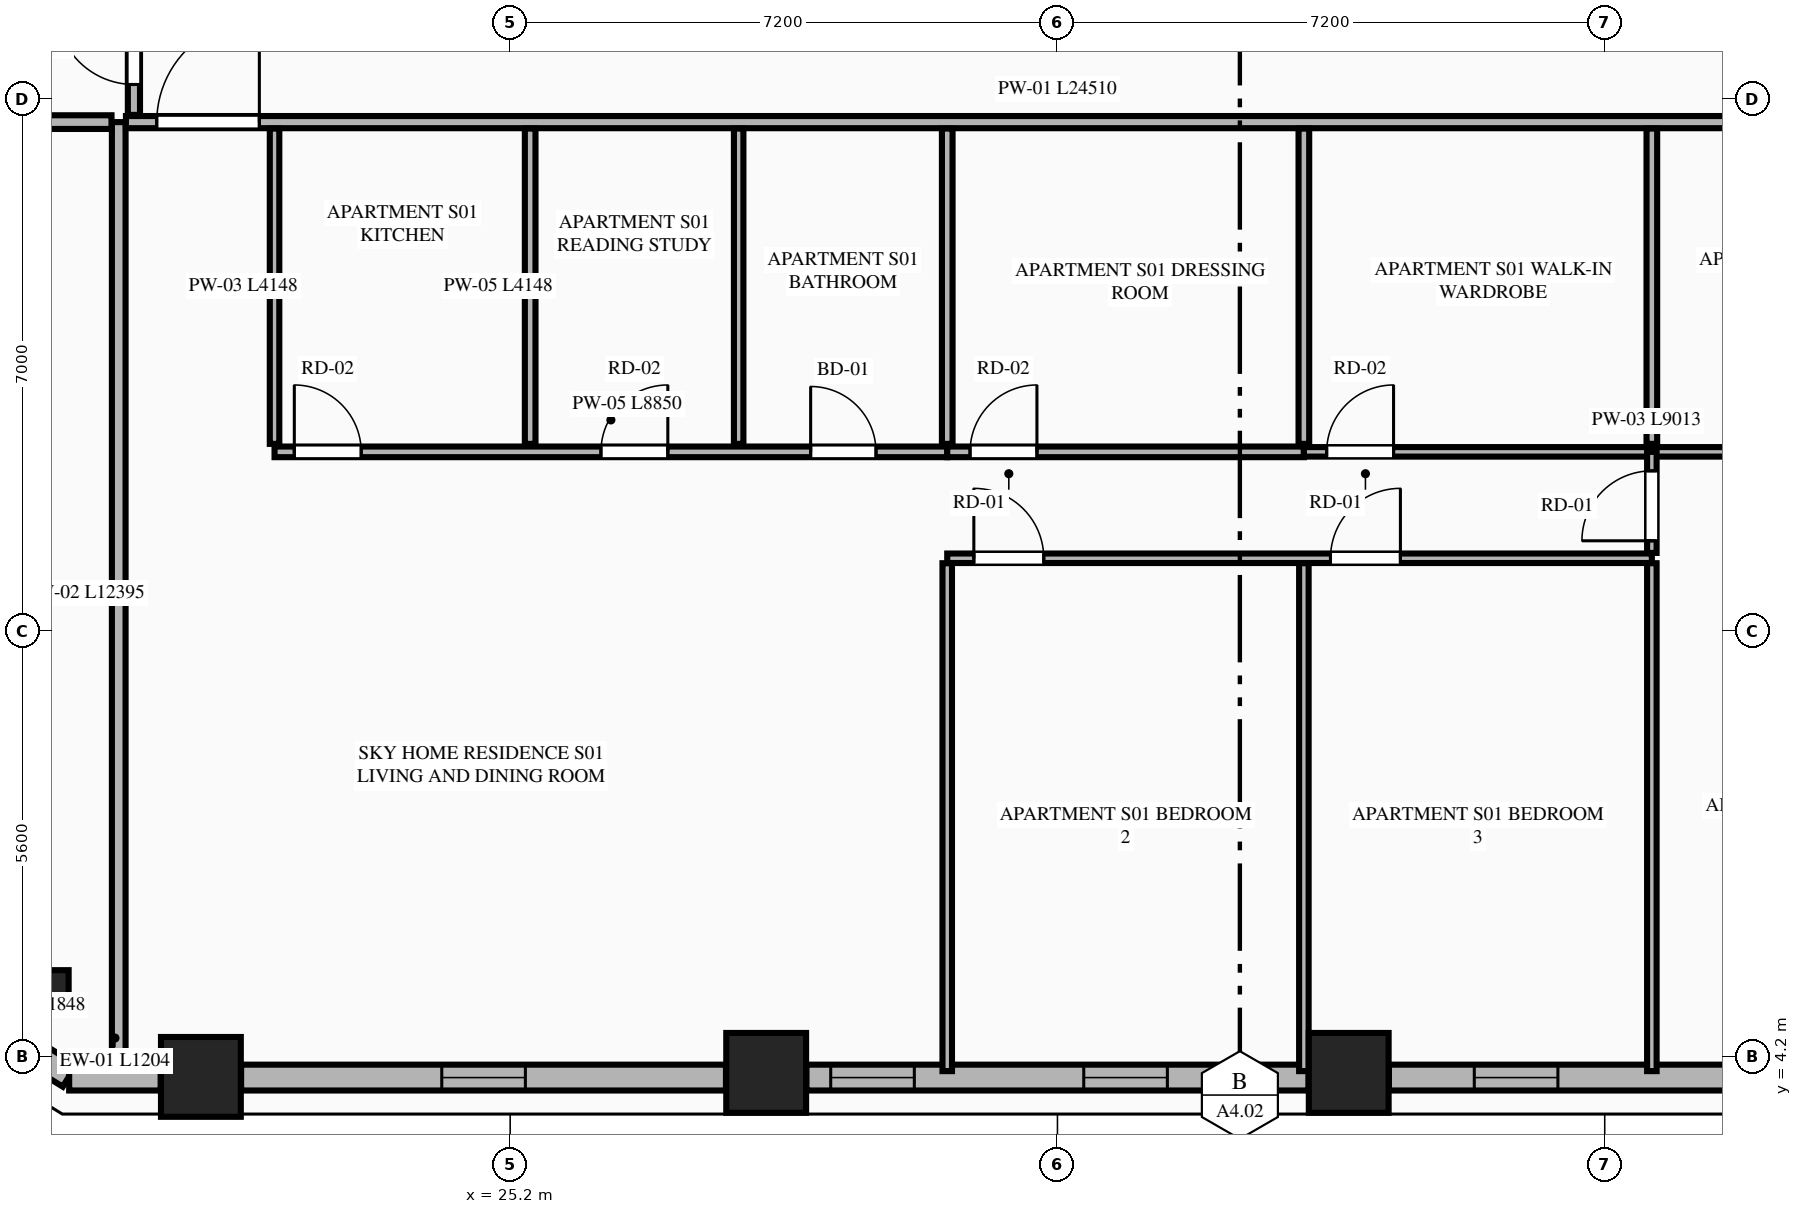
"""IFC4 building model, lengths in metres.
Left out: names, types, materials, properties, quantities, classifications, styles, units other than length and angle.
Written with IfcOpenShell. Run it as: python <this file> out.ifc"""

import sys

from ifc_helpers import new_model, si_unit, direction, frame, frame_2d, origin, origin_2d, place, context, subcontext, project, spatial, rectangle, extrude, element, fill, save


model = new_model("IFC4")
c1 = context("Model", 3, precision=1e-05, world=origin(), true_north=direction((0.0, 1.0)))
c2 = subcontext(c1, "Body", "Model", "MODEL_VIEW")
j1 = project(units=[si_unit("LENGTHUNIT", "METRE"), si_unit("PLANEANGLEUNIT", "RADIAN")], contexts=[c1])
p1 = place(None, origin())
s1 = spatial("IfcSite", under=j1, at=p1, CompositionType="ELEMENT")
p2 = place(p1, origin())
s2 = spatial("IfcBuilding", under=s1, at=p2, CompositionType="ELEMENT")
p3 = place(p2, frame((0.0, 0.0, 144.55)))
s3 = spatial("IfcBuildingStorey", under=s2, at=p3, CompositionType="ELEMENT", Elevation=144.55)
for number, where, z_axis, x_axis in (
    (1, (21.131, 3.939, 0.0), (0.0, 0.0, 1.0), (1.0, 0.0, 0.0)),
    (2, (28.568, 3.992, 0.0), (0.0, 0.0, 1.0), (1.0, 0.0, 0.0)),
    (3, (36.232, 3.992, 0.0), (0.0, 0.0, 1.0), (1.0, 0.0, 0.0)),
):
    element("IfcColumn", number, at=place(p3, frame(where, z_axis=z_axis, x_axis=x_axis)), inside=s3, PredefinedType="COLUMN", context=c2, shape_type="SweptSolid", body=[
        extrude(rectangle(XDim=1.05, YDim=1.05, at=origin_2d()), origin(), (0.0, 0.0, 1.0), 3.55),
    ])
p4 = place(p3, frame((19.141, 5.093, 0.0), z_axis=(0.0, 0.0, 1.0), x_axis=(0.865160173452, -0.501495637342, 0.0)))
e4 = element("IfcColumn", 4, at=p4, inside=s3, PredefinedType="PILASTER", context=c2, shape_type="SweptSolid", body=[
    extrude(rectangle(XDim=0.5, YDim=0.35, at=origin_2d()), origin(), (0.0, 0.0, 1.0), 3.55),
])
p5 = place(p3, frame((17.829, 4.923, 0.0), z_axis=(0.0, 0.0, 1.0), x_axis=(0.851798915137, -0.523868884523, 0.0)))
e5 = element("IfcWall", 5, at=p5, inside=s3, PredefinedType="STANDARD", context=c2, shape_type="SweptSolid", body=[
    extrude(rectangle(XDim=1.848, YDim=0.34, at=frame_2d((0.924, 0.0))), origin(), (0.0, 0.0, 1.0), 3.27),
])
p6 = place(p3, frame((19.398, 3.93, 0.0), z_axis=(0.0, 0.0, 1.0), x_axis=(1.0, 0.0, 0.0)))
e6 = element("IfcWall", 6, at=p6, inside=s3, PredefinedType="STANDARD", context=c2, shape_type="SweptSolid", body=[
    extrude(rectangle(XDim=1.204, YDim=0.34, at=frame_2d((0.602, 0.0))), origin(), (0.0, 0.0, 1.0), 3.27),
])
p7 = place(p3, frame((21.66, 3.93, 0.0), z_axis=(0.0, 0.0, 1.0), x_axis=(1.0, 0.0, 0.0)))
e7 = element("IfcWall", 7, at=p7, inside=s3, PredefinedType="STANDARD", context=c2, shape_type="SweptSolid", body=[
    extrude(rectangle(XDim=6.379, YDim=0.34, at=frame_2d((3.189, 0.0))), origin(), (0.0, 0.0, 1.0), 2.727),
])
p8 = place(p7, frame((2.64, 0.0, 0.75)))
e8 = element("IfcOpeningElement", 8, at=p8, cuts=e7, PredefinedType="OPENING", context=c2, shape_type="SweptSolid", body=[
    extrude(rectangle(XDim=1.1, YDim=1.827, at=frame_2d((0.55, 0.914))), frame((0.0, 0.18, 0.0), z_axis=(0.0, -1.0, 0.0), x_axis=(1.0, 0.0, 0.0)), (0.0, 0.0, 1.0), 0.36),
])
p9 = place(p3, frame((29.097, 3.93, 0.0), z_axis=(0.0, 0.0, 1.0), x_axis=(1.0, 0.0, 0.0)))
e9 = element("IfcWall", 9, at=p9, inside=s3, PredefinedType="STANDARD", context=c2, shape_type="SweptSolid", body=[
    extrude(rectangle(XDim=6.606, YDim=0.34, at=frame_2d((3.303, 0.0))), origin(), (0.0, 0.0, 1.0), 2.727),
])
p10 = place(p9, frame((0.32, 0.0, 0.75)))
e10 = element("IfcOpeningElement", 10, at=p10, cuts=e9, PredefinedType="OPENING", context=c2, shape_type="SweptSolid", body=[
    extrude(rectangle(XDim=1.1, YDim=1.827, at=frame_2d((0.55, 0.914))), frame((0.0, 0.18, 0.0), z_axis=(0.0, -1.0, 0.0), x_axis=(1.0, 0.0, 0.0)), (0.0, 0.0, 1.0), 0.36),
])
p11 = place(p9, frame((3.649, 0.0, 0.75)))
e11 = element("IfcOpeningElement", 11, at=p11, cuts=e9, PredefinedType="OPENING", context=c2, shape_type="SweptSolid", body=[
    extrude(rectangle(XDim=1.1, YDim=1.827, at=frame_2d((0.55, 0.914))), frame((0.0, 0.18, 0.0), z_axis=(0.0, -1.0, 0.0), x_axis=(1.0, 0.0, 0.0)), (0.0, 0.0, 1.0), 0.36),
])
p12 = place(p3, frame((36.761, 3.93, 0.0), z_axis=(0.0, 0.0, 1.0), x_axis=(1.0, 0.0, 0.0)))
e12 = element("IfcWall", 12, at=p12, inside=s3, PredefinedType="STANDARD", context=c2, shape_type="SweptSolid", body=[
    extrude(rectangle(XDim=6.379, YDim=0.34, at=frame_2d((3.189, 0.0))), origin(), (0.0, 0.0, 1.0), 2.727),
])
p13 = place(p12, frame((1.123, 0.0, 0.75)))
e13 = element("IfcOpeningElement", 13, at=p13, cuts=e12, PredefinedType="OPENING", context=c2, shape_type="SweptSolid", body=[
    extrude(rectangle(XDim=1.1, YDim=1.827, at=frame_2d((0.55, 0.914))), frame((0.0, 0.18, 0.0), z_axis=(0.0, -1.0, 0.0), x_axis=(1.0, 0.0, 0.0)), (0.0, 0.0, 1.0), 0.36),
])
p14 = place(p12, frame((4.425, 0.0, 0.75)))
e14 = element("IfcOpeningElement", 14, at=p14, cuts=e12, PredefinedType="OPENING", context=c2, shape_type="SweptSolid", body=[
    extrude(rectangle(XDim=1.1, YDim=1.827, at=frame_2d((0.55, 0.914))), frame((0.0, 0.18, 0.0), z_axis=(0.0, -1.0, 0.0), x_axis=(1.0, 0.0, 0.0)), (0.0, 0.0, 1.0), 0.36),
])
p15 = place(p3, frame((20.05, 4.105, 0.0), z_axis=(0.0, 0.0, 1.0), x_axis=(0.0, 1.0, 0.0)))
e15 = element("IfcWall", 15, at=p15, inside=s3, PredefinedType="PARTITIONING", context=c2, shape_type="SweptSolid", body=[
    extrude(rectangle(XDim=12.395, YDim=0.18, at=frame_2d((6.198, 0.0))), origin(), (0.0, 0.0, 1.0), 3.27),
])
p16 = place(p3, frame((20.145, 16.5, 0.0), z_axis=(0.0, 0.0, 1.0), x_axis=(1.0, 0.0, 0.0)))
e16 = element("IfcWall", 16, at=p16, inside=s3, PredefinedType="PARTITIONING", context=c2, shape_type="SweptSolid", body=[
    extrude(rectangle(XDim=24.51, YDim=0.16, at=frame_2d((12.255, 0.0))), origin(), (0.0, 0.0, 1.0), 3.27),
])
p17 = place(p16, frame((0.405, 0.0, 0.0)))
e17 = element("IfcOpeningElement", 17, at=p17, cuts=e16, PredefinedType="OPENING", context=c2, shape_type="SweptSolid", body=[
    extrude(rectangle(XDim=1.35, YDim=2.35, at=frame_2d((0.675, 1.175))), frame((0.0, 0.09, 0.0), z_axis=(0.0, -1.0, 0.0), x_axis=(1.0, 0.0, 0.0)), (0.0, 0.0, 1.0), 0.18),
])
p18 = place(p3, frame((22.1, 12.267, 0.0), z_axis=(0.0, 0.0, 1.0), x_axis=(0.0, 1.0, 0.0)))
e18 = element("IfcWall", 18, at=p18, inside=s3, PredefinedType="PARTITIONING", context=c2, shape_type="SweptSolid", body=[
    extrude(rectangle(XDim=4.148, YDim=0.125, at=frame_2d((2.074, 0.0))), origin(), (0.0, 0.0, 1.0), 2.652),
])
p19 = place(p3, frame((22.1, 12.162, 0.0), z_axis=(0.0, 0.0, 1.0), x_axis=(1.0, 0.0, 0.0)))
e19 = element("IfcWall", 19, at=p19, inside=s3, PredefinedType="PLUMBINGWALL", context=c2, shape_type="SweptSolid", body=[
    extrude(rectangle(XDim=8.85, YDim=0.14, at=frame_2d((4.425, 0.0))), origin(), (0.0, 0.0, 1.0), 3.27),
])
p20 = place(p19, frame((7.053, 0.0, 0.0)))
e20 = element("IfcOpeningElement", 20, at=p20, cuts=e19, PredefinedType="OPENING", context=c2, shape_type="SweptSolid", body=[
    extrude(rectangle(XDim=0.86, YDim=2.1, at=frame_2d((0.43, 1.05))), frame((0.0, 0.08, 0.0), z_axis=(0.0, -1.0, 0.0), x_axis=(1.0, 0.0, 0.0)), (0.0, 0.0, 1.0), 0.16),
])
p21 = place(p19, frame((0.26, 0.0, 0.0)))
e21 = element("IfcOpeningElement", 21, at=p21, cuts=e19, PredefinedType="OPENING", context=c2, shape_type="SweptSolid", body=[
    extrude(rectangle(XDim=0.88, YDim=2.15, at=frame_2d((0.44, 1.075))), frame((0.0, 0.08, 0.0), z_axis=(0.0, -1.0, 0.0), x_axis=(1.0, 0.0, 0.0)), (0.0, 0.0, 1.0), 0.16),
])
p22 = place(p19, frame((4.294, 0.0, 0.0)))
e22 = element("IfcOpeningElement", 22, at=p22, cuts=e19, PredefinedType="OPENING", context=c2, shape_type="SweptSolid", body=[
    extrude(rectangle(XDim=0.88, YDim=2.15, at=frame_2d((0.44, 1.075))), frame((0.0, 0.08, 0.0), z_axis=(0.0, -1.0, 0.0), x_axis=(1.0, 0.0, 0.0)), (0.0, 0.0, 1.0), 0.16),
])
p23 = place(p3, frame((30.95, 12.162, 0.0), z_axis=(0.0, 0.0, 1.0), x_axis=(1.0, 0.0, 0.0)))
e23 = element("IfcWall", 23, at=p23, inside=s3, PredefinedType="PLUMBINGWALL", context=c2, shape_type="SweptSolid", body=[
    extrude(rectangle(XDim=4.692, YDim=0.14, at=frame_2d((2.346, 0.0))), origin(), (0.0, 0.0, 1.0), 3.27),
])
p24 = place(p23, frame((0.3, 0.0, 0.0)))
e24 = element("IfcOpeningElement", 24, at=p24, cuts=e23, PredefinedType="OPENING", context=c2, shape_type="SweptSolid", body=[
    extrude(rectangle(XDim=0.88, YDim=2.15, at=frame_2d((0.44, 1.075))), frame((0.0, 0.08, 0.0), z_axis=(0.0, -1.0, 0.0), x_axis=(1.0, 0.0, 0.0)), (0.0, 0.0, 1.0), 0.16),
])
p25 = place(p3, frame((35.642, 12.162, 0.0), z_axis=(0.0, 0.0, 1.0), x_axis=(1.0, 0.0, 0.0)))
e25 = element("IfcWall", 25, at=p25, inside=s3, PredefinedType="PARTITIONING", context=c2, shape_type="SweptSolid", body=[
    extrude(rectangle(XDim=9.013, YDim=0.125, at=frame_2d((4.506, 0.0))), origin(), (0.0, 0.0, 1.0), 3.27),
])
p26 = place(p25, frame((6.37, 0.0, 0.0)))
e26 = element("IfcOpeningElement", 26, at=p26, cuts=e25, PredefinedType="OPENING", context=c2, shape_type="SweptSolid", body=[
    extrude(rectangle(XDim=0.86, YDim=2.1, at=frame_2d((0.43, 1.05))), frame((0.0, 0.073, 0.0), z_axis=(0.0, -1.0, 0.0), x_axis=(1.0, 0.0, 0.0)), (0.0, 0.0, 1.0), 0.145),
])
p27 = place(p25, frame((0.3, 0.0, 0.0)))
e27 = element("IfcOpeningElement", 27, at=p27, cuts=e25, PredefinedType="OPENING", context=c2, shape_type="SweptSolid", body=[
    extrude(rectangle(XDim=0.88, YDim=2.15, at=frame_2d((0.44, 1.075))), frame((0.0, 0.073, 0.0), z_axis=(0.0, -1.0, 0.0), x_axis=(1.0, 0.0, 0.0)), (0.0, 0.0, 1.0), 0.145),
])
p28 = place(p3, frame((25.463, 12.267, 0.0), z_axis=(0.0, 0.0, 1.0), x_axis=(0.0, 1.0, 0.0)))
e28 = element("IfcWall", 28, at=p28, inside=s3, PredefinedType="PLUMBINGWALL", context=c2, shape_type="SweptSolid", body=[
    extrude(rectangle(XDim=4.148, YDim=0.14, at=frame_2d((2.074, 0.0))), origin(), (0.0, 0.0, 1.0), 3.27),
])
p29 = place(p3, frame((28.206, 12.267, 0.0), z_axis=(0.0, 0.0, 1.0), x_axis=(0.0, 1.0, 0.0)))
e29 = element("IfcWall", 29, at=p29, inside=s3, PredefinedType="PARTITIONING", context=c2, shape_type="SweptSolid", body=[
    extrude(rectangle(XDim=4.148, YDim=0.125, at=frame_2d((2.074, 0.0))), origin(), (0.0, 0.0, 1.0), 3.27),
])
p30 = place(p3, frame((30.95, 4.015, 0.0), z_axis=(0.0, 0.0, 1.0), x_axis=(0.0, 1.0, 0.0)))
e30 = element("IfcWall", 30, at=p30, inside=s3, PredefinedType="PARTITIONING", context=c2, shape_type="SweptSolid", body=[
    extrude(rectangle(XDim=6.682, YDim=0.125, at=frame_2d((3.341, 0.0))), origin(), (0.0, 0.0, 1.0), 3.27),
])
p31 = place(p3, frame((30.95, 10.762, 0.0), z_axis=(0.0, 0.0, 1.0), x_axis=(1.0, 0.0, 0.0)))
e31 = element("IfcWall", 31, at=p31, inside=s3, PredefinedType="PARTITIONING", context=c2, shape_type="SweptSolid", body=[
    extrude(rectangle(XDim=9.27, YDim=0.125, at=frame_2d((4.635, 0.0))), origin(), (0.0, 0.0, 1.0), 3.27),
])
p32 = place(p31, frame((0.35, 0.0, 0.0)))
e32 = element("IfcOpeningElement", 32, at=p32, cuts=e31, PredefinedType="OPENING", context=c2, shape_type="SweptSolid", body=[
    extrude(rectangle(XDim=0.92, YDim=2.15, at=frame_2d((0.46, 1.075))), frame((0.0, 0.073, 0.0), z_axis=(0.0, -1.0, 0.0), x_axis=(1.0, 0.0, 0.0)), (0.0, 0.0, 1.0), 0.145),
])
p33 = place(p31, frame((5.042, 0.0, 0.0)))
e33 = element("IfcOpeningElement", 33, at=p33, cuts=e31, PredefinedType="OPENING", context=c2, shape_type="SweptSolid", body=[
    extrude(rectangle(XDim=0.92, YDim=2.15, at=frame_2d((0.46, 1.075))), frame((0.0, 0.073, 0.0), z_axis=(0.0, -1.0, 0.0), x_axis=(1.0, 0.0, 0.0)), (0.0, 0.0, 1.0), 0.145),
])
p34 = place(p3, frame((40.22, 10.832, 0.0), z_axis=(0.0, 0.0, 1.0), x_axis=(0.0, 1.0, 0.0)))
e34 = element("IfcWall", 34, at=p34, inside=s3, PredefinedType="PARTITIONING", context=c2, shape_type="SweptSolid", body=[
    extrude(rectangle(XDim=1.33, YDim=0.125, at=frame_2d((0.665, 0.0))), origin(), (0.0, 0.0, 1.0), 3.27),
])
p35 = place(p34, frame((0.16, 0.0, 0.0)))
e35 = element("IfcOpeningElement", 35, at=p35, cuts=e34, PredefinedType="OPENING", context=c2, shape_type="SweptSolid", body=[
    extrude(rectangle(XDim=0.92, YDim=2.15, at=frame_2d((0.46, 1.075))), frame((0.0, 0.073, 0.0), z_axis=(0.0, -1.0, 0.0), x_axis=(1.0, 0.0, 0.0)), (0.0, 0.0, 1.0), 0.145),
])
for number, where, z_axis, x_axis in (
    (36, (30.95, 12.267, 0.0), (0.0, 0.0, 1.0), (0.0, 1.0, 0.0)),
    (37, (35.642, 12.267, 0.0), (0.0, 0.0, 1.0), (0.0, 1.0, 0.0)),
):
    element("IfcWall", number, at=place(p3, frame(where, z_axis=z_axis, x_axis=x_axis)), inside=s3, PredefinedType="PLUMBINGWALL", context=c2, shape_type="SweptSolid", body=[
        extrude(rectangle(XDim=4.148, YDim=0.14, at=frame_2d((2.074, 0.0))), origin(), (0.0, 0.0, 1.0), 3.27),
    ])
for number, where, z_axis, x_axis in (
    (38, (35.642, 4.015, 0.0), (0.0, 0.0, 1.0), (0.0, 1.0, 0.0)),
    (39, (40.22, 4.015, 0.0), (0.0, 0.0, 1.0), (0.0, 1.0, 0.0)),
):
    element("IfcWall", number, at=place(p3, frame(where, z_axis=z_axis, x_axis=x_axis)), inside=s3, PredefinedType="PARTITIONING", context=c2, shape_type="SweptSolid", body=[
        extrude(rectangle(XDim=6.682, YDim=0.125, at=frame_2d((3.341, 0.0))), origin(), (0.0, 0.0, 1.0), 3.27),
    ])
p36 = place(p3, frame((40.22, 12.267, 0.0), z_axis=(0.0, 0.0, 1.0), x_axis=(0.0, 1.0, 0.0)))
e40 = element("IfcWall", 40, at=p36, inside=s3, PredefinedType="PLUMBINGWALL", context=c2, shape_type="SweptSolid", body=[
    extrude(rectangle(XDim=4.148, YDim=0.14, at=frame_2d((2.074, 0.0))), origin(), (0.0, 0.0, 1.0), 3.27),
])
p37 = place(p3, frame((12.185, 16.5, 0.0), z_axis=(0.0, 0.0, 1.0), x_axis=(1.0, 0.0, 0.0)))
e41 = element("IfcWall", 41, at=p37, inside=s3, PredefinedType="PARTITIONING", context=c2, shape_type="SweptSolid", body=[
    extrude(rectangle(XDim=7.77, YDim=0.18, at=frame_2d((3.885, 0.0))), origin(), (0.0, 0.0, 1.0), 3.27),
])
p38 = place(p3, frame((20.25, 16.595, 0.0), z_axis=(0.0, 0.0, 1.0), x_axis=(0.0, 1.0, 0.0)))
e42 = element("IfcWall", 42, at=p38, inside=s3, PredefinedType="PARTITIONING", context=c2, shape_type="SweptSolid", body=[
    extrude(rectangle(XDim=7.706, YDim=0.16, at=frame_2d((3.853, 0.0))), origin(), (0.0, 0.0, 1.0), 3.27),
])
p39 = place(p38, frame((0.4, 0.0, 0.0)))
e43 = element("IfcOpeningElement", 43, at=p39, cuts=e42, PredefinedType="OPENING", context=c2, shape_type="SweptSolid", body=[
    extrude(rectangle(XDim=1.02, YDim=2.25, at=frame_2d((0.51, 1.125))), frame((0.0, 0.09, 0.0), z_axis=(0.0, -1.0, 0.0), x_axis=(1.0, 0.0, 0.0)), (0.0, 0.0, 1.0), 0.18),
])
p40 = place(p8, origin())
e44 = element("IfcWindow", 44, at=p40, inside=s3, PartitioningType="SINGLE_PANEL", PredefinedType="WINDOW", context=c2, shape_type="SweptSolid", body=[
    extrude(rectangle(XDim=1.1, YDim=1.827, at=frame_2d((0.55, 0.914))), frame((0.0, 0.03, 0.0), z_axis=(0.0, -1.0, 0.0), x_axis=(1.0, 0.0, 0.0)), (0.0, 0.0, 1.0), 0.06),
])
fill(e8, e44)
p41 = place(p10, origin())
e45 = element("IfcWindow", 45, at=p41, inside=s3, PartitioningType="SINGLE_PANEL", PredefinedType="WINDOW", context=c2, shape_type="SweptSolid", body=[
    extrude(rectangle(XDim=1.1, YDim=1.827, at=frame_2d((0.55, 0.914))), frame((0.0, 0.03, 0.0), z_axis=(0.0, -1.0, 0.0), x_axis=(1.0, 0.0, 0.0)), (0.0, 0.0, 1.0), 0.06),
])
fill(e10, e45)
p42 = place(p13, origin())
e46 = element("IfcWindow", 46, at=p42, inside=s3, PartitioningType="SINGLE_PANEL", PredefinedType="WINDOW", context=c2, shape_type="SweptSolid", body=[
    extrude(rectangle(XDim=1.1, YDim=1.827, at=frame_2d((0.55, 0.914))), frame((0.0, 0.03, 0.0), z_axis=(0.0, -1.0, 0.0), x_axis=(1.0, 0.0, 0.0)), (0.0, 0.0, 1.0), 0.06),
])
fill(e13, e46)
p43 = place(p20, origin())
e47 = element("IfcDoor", 47, at=p43, inside=s3, OperationType="SINGLE_SWING_LEFT", PredefinedType="DOOR", context=c2, shape_type="SweptSolid", body=[
    extrude(rectangle(XDim=0.86, YDim=2.1, at=frame_2d((0.43, 1.05))), frame((0.0, 0.025, 0.0), z_axis=(0.0, -1.0, 0.0), x_axis=(1.0, 0.0, 0.0)), (0.0, 0.0, 1.0), 0.05),
])
fill(e20, e47)
p44 = place(p17, origin())
e48 = element("IfcDoor", 48, at=p44, inside=s3, OperationType="SINGLE_SWING_RIGHT", PredefinedType="DOOR", context=c2, shape_type="SweptSolid", body=[
    extrude(rectangle(XDim=1.35, YDim=2.35, at=frame_2d((0.675, 1.175))), frame((0.0, 0.025, 0.0), z_axis=(0.0, -1.0, 0.0), x_axis=(1.0, 0.0, 0.0)), (0.0, 0.0, 1.0), 0.05),
])
fill(e17, e48)
p45 = place(p21, origin())
e49 = element("IfcDoor", 49, at=p45, inside=s3, OperationType="SINGLE_SWING_LEFT", PredefinedType="DOOR", context=c2, shape_type="SweptSolid", body=[
    extrude(rectangle(XDim=0.88, YDim=2.15, at=frame_2d((0.44, 1.075))), frame((0.0, 0.025, 0.0), z_axis=(0.0, -1.0, 0.0), x_axis=(1.0, 0.0, 0.0)), (0.0, 0.0, 1.0), 0.05),
])
fill(e21, e49)
p46 = place(p22, origin())
e50 = element("IfcDoor", 50, at=p46, inside=s3, OperationType="SINGLE_SWING_RIGHT", PredefinedType="DOOR", context=c2, shape_type="SweptSolid", body=[
    extrude(rectangle(XDim=0.88, YDim=2.15, at=frame_2d((0.44, 1.075))), frame((0.0, 0.025, 0.0), z_axis=(0.0, -1.0, 0.0), x_axis=(1.0, 0.0, 0.0)), (0.0, 0.0, 1.0), 0.05),
])
fill(e22, e50)
p47 = place(p24, origin())
e51 = element("IfcDoor", 51, at=p47, inside=s3, OperationType="SINGLE_SWING_RIGHT", PredefinedType="DOOR", context=c2, shape_type="SweptSolid", body=[
    extrude(rectangle(XDim=0.88, YDim=2.15, at=frame_2d((0.44, 1.075))), frame((0.0, 0.025, 0.0), z_axis=(0.0, -1.0, 0.0), x_axis=(1.0, 0.0, 0.0)), (0.0, 0.0, 1.0), 0.05),
])
fill(e24, e51)
p48 = place(p32, origin())
e52 = element("IfcDoor", 52, at=p48, inside=s3, OperationType="SINGLE_SWING_LEFT", PredefinedType="DOOR", context=c2, shape_type="SweptSolid", body=[
    extrude(rectangle(XDim=0.92, YDim=2.15, at=frame_2d((0.46, 1.075))), frame((0.0, 0.025, 0.0), z_axis=(0.0, -1.0, 0.0), x_axis=(1.0, 0.0, 0.0)), (0.0, 0.0, 1.0), 0.05),
])
fill(e32, e52)
p49 = place(p33, origin())
e53 = element("IfcDoor", 53, at=p49, inside=s3, OperationType="SINGLE_SWING_RIGHT", PredefinedType="DOOR", context=c2, shape_type="SweptSolid", body=[
    extrude(rectangle(XDim=0.92, YDim=2.15, at=frame_2d((0.46, 1.075))), frame((0.0, 0.025, 0.0), z_axis=(0.0, -1.0, 0.0), x_axis=(1.0, 0.0, 0.0)), (0.0, 0.0, 1.0), 0.05),
])
fill(e33, e53)
p50 = place(p35, origin())
e54 = element("IfcDoor", 54, at=p50, inside=s3, OperationType="SINGLE_SWING_LEFT", PredefinedType="DOOR", context=c2, shape_type="SweptSolid", body=[
    extrude(rectangle(XDim=0.92, YDim=2.15, at=frame_2d((0.46, 1.075))), frame((0.0, 0.025, 0.0), z_axis=(0.0, -1.0, 0.0), x_axis=(1.0, 0.0, 0.0)), (0.0, 0.0, 1.0), 0.05),
])
fill(e35, e54)
p51 = place(p27, origin())
e55 = element("IfcDoor", 55, at=p51, inside=s3, OperationType="SINGLE_SWING_RIGHT", PredefinedType="DOOR", context=c2, shape_type="SweptSolid", body=[
    extrude(rectangle(XDim=0.88, YDim=2.15, at=frame_2d((0.44, 1.075))), frame((0.0, 0.025, 0.0), z_axis=(0.0, -1.0, 0.0), x_axis=(1.0, 0.0, 0.0)), (0.0, 0.0, 1.0), 0.05),
])
fill(e27, e55)
p52 = place(p39, origin())
e56 = element("IfcDoor", 56, at=p52, inside=s3, OperationType="SINGLE_SWING_RIGHT", PredefinedType="DOOR", context=c2, shape_type="SweptSolid", body=[
    extrude(rectangle(XDim=1.02, YDim=2.25, at=frame_2d((0.51, 1.125))), frame((0.0, 0.025, 0.0), z_axis=(0.0, -1.0, 0.0), x_axis=(1.0, 0.0, 0.0)), (0.0, 0.0, 1.0), 0.05),
])
fill(e43, e56)
p53 = place(p11, origin())
e57 = element("IfcWindow", 57, at=p53, inside=s3, PartitioningType="SINGLE_PANEL", PredefinedType="WINDOW", context=c2, shape_type="SweptSolid", body=[
    extrude(rectangle(XDim=1.1, YDim=1.827, at=frame_2d((0.55, 0.914))), frame((0.0, 0.03, 0.0), z_axis=(0.0, -1.0, 0.0), x_axis=(1.0, 0.0, 0.0)), (0.0, 0.0, 1.0), 0.06),
])
fill(e11, e57)
save(model, sys.argv[1])
